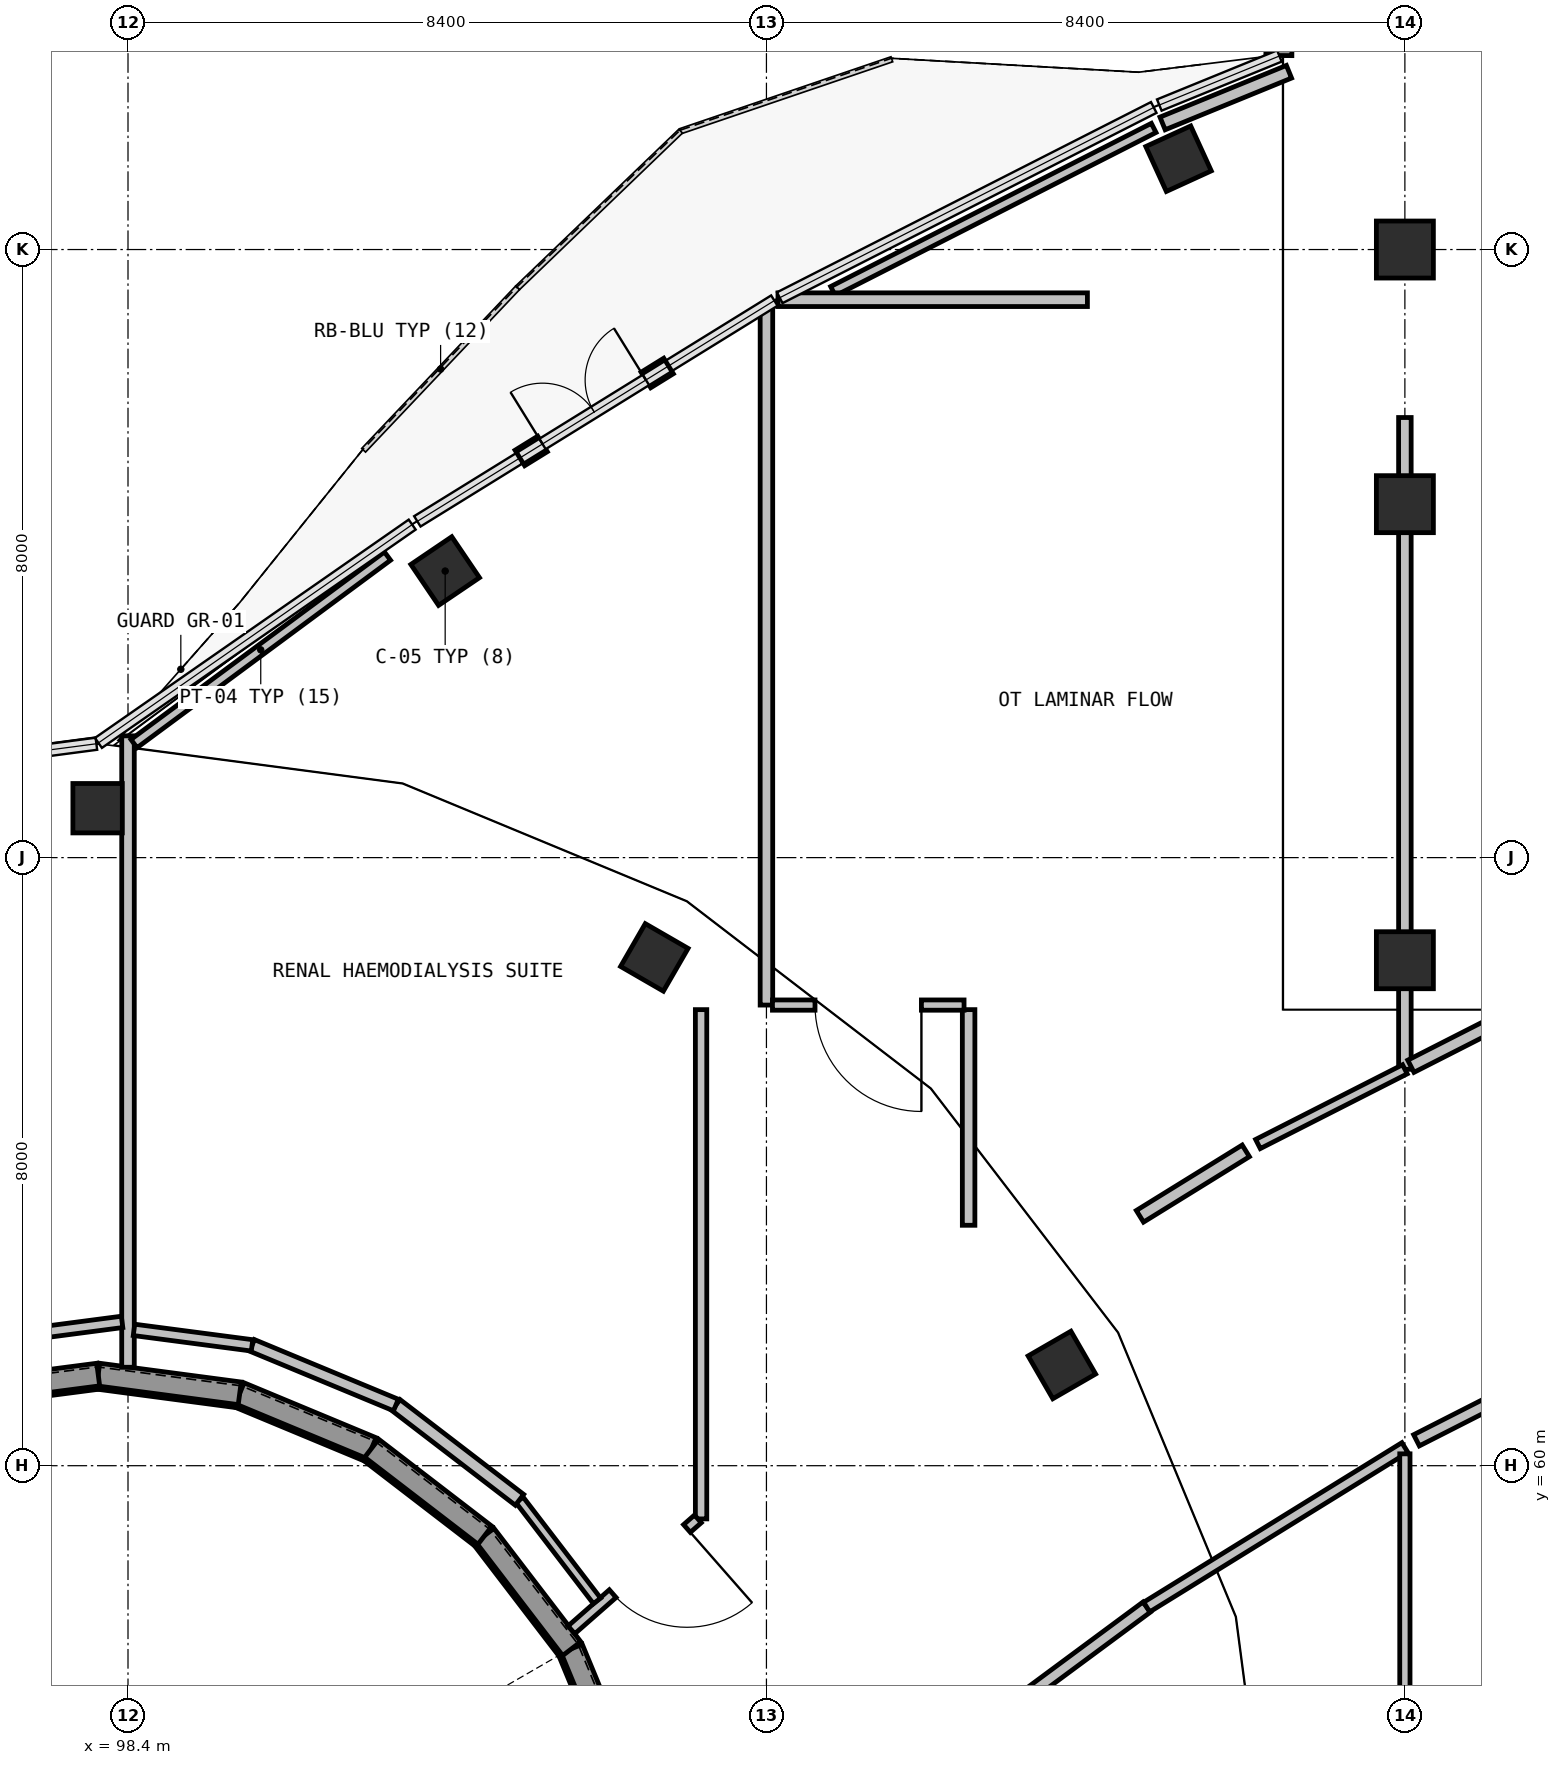
"""IFC4 building model, lengths in metres.
Left out: names, types, materials, properties, quantities, classifications, styles, units other than length and angle.
Written with IfcOpenShell. Run it as: python <this file> out.ifc"""

import sys

from ifc_helpers import new_model, si_unit, direction, frame, frame_2d, origin, origin_2d, place, context, subcontext, project, spatial, rectangle, circle, extrude, element, fill, save


model = new_model("IFC4")
c1 = context("Model", 3, precision=1e-05, world=origin(), true_north=direction((0.0, 1.0)))
c2 = subcontext(c1, "Body", "Model", "MODEL_VIEW")
j1 = project(units=[si_unit("LENGTHUNIT", "METRE"), si_unit("PLANEANGLEUNIT", "RADIAN")], contexts=[c1])
p1 = place(None, origin())
s1 = spatial("IfcSite", under=j1, at=p1, CompositionType="ELEMENT")
p2 = place(p1, origin())
s2 = spatial("IfcBuilding", under=s1, at=p2, CompositionType="ELEMENT")
p3 = place(p2, frame((0.0, 0.0, 15.0)))
s3 = spatial("IfcBuildingStorey", under=s2, at=p3, CompositionType="ELEMENT", Elevation=15.0)
for number, where, z_axis, x_axis in (
    (1, (110.687, 61.325, 0.0), (0.0, 0.0, 1.0), (0.866, 0.5, 0.0)),
    (2, (105.325, 66.687, 0.0), (0.0, 0.0, 1.0), (0.5, 0.866, 0.0)),
    (3, (98.0, 68.65, 0.0), (0.0, 0.0, 1.0), (0.0, 1.0, 0.0)),
):
    element("IfcColumn", number, at=place(p3, frame(where, z_axis=z_axis, x_axis=x_axis)), inside=s3, PredefinedType="COLUMN", context=c2, shape_type="SweptSolid", body=[
        extrude(circle(Radius=0.325, at=origin_2d()), origin(), (0.0, 0.0, 1.0), 4.2),
    ])
for number, where, z_axis, x_axis in (
    (4, (115.2, 66.65, 0.0), (0.0, 0.0, 1.0), (1.0, 0.0, 0.0)),
    (5, (115.2, 72.65, 0.0), (0.0, 0.0, 1.0), (1.0, 0.0, 0.0)),
    (6, (115.2, 76.0, 0.0), (0.0, 0.0, 1.0), (1.0, 0.0, 0.0)),
):
    element("IfcColumn", number, at=place(p3, frame(where, z_axis=z_axis, x_axis=x_axis)), inside=s3, PredefinedType="COLUMN", context=c2, shape_type="SweptSolid", body=[
        extrude(rectangle(XDim=0.75, YDim=0.75, at=origin_2d()), origin(), (0.0, 0.0, 1.0), 4.2),
    ])
for number, where, z_axis, x_axis in (
    (7, (102.573, 71.77, 0.0), (0.0, 0.0, 1.0), (-0.561, 0.828, 0.0)),
    (8, (112.222, 77.195, 0.0), (0.0, 0.0, 1.0), (-0.416, 0.909, 0.0)),
):
    element("IfcColumn", number, at=place(p3, frame(where, z_axis=z_axis, x_axis=x_axis)), inside=s3, PredefinedType="COLUMN", context=c2, shape_type="SweptSolid", body=[
        extrude(rectangle(XDim=0.65, YDim=0.65, at=origin_2d()), origin(), (0.0, 0.0, 1.0), 3.91),
    ])
p4 = place(p3, frame((103.556, 73.258, 0.0), z_axis=(0.0, 0.0, 1.0), x_axis=(0.85044606758, 0.526062245498, 0.0)))
e9 = element("IfcWall", 9, at=p4, inside=s3, PredefinedType="SOLIDWALL", context=c2, shape_type="SweptSolid", body=[
    extrude(rectangle(XDim=2.3, YDim=0.24, at=frame_2d((1.15, 0.0))), origin(), (0.0, 0.0, 1.0), 2.32),
])
p5 = place(p4, frame((0.35, 0.0, 0.0)))
e10 = element("IfcOpeningElement", 10, at=p5, cuts=e9, PredefinedType="OPENING", context=c2, shape_type="SweptSolid", body=[
    extrude(rectangle(XDim=1.6, YDim=2.2, at=frame_2d((0.8, 1.1))), frame((0.0, 0.13, 0.0), z_axis=(0.0, -1.0, 0.0), x_axis=(1.0, 0.0, 0.0)), (0.0, 0.0, 1.0), 0.26),
])
p6 = place(p3, frame((113.563, 78.552, 0.0), z_axis=(0.0, 0.0, 1.0), x_axis=(0.006887325881, 0.99997628209, 0.0)))
e11 = element("IfcWall", 11, at=p6, inside=s3, PredefinedType="SOLIDWALL", context=c2, shape_type="SweptSolid", body=[
    extrude(rectangle(XDim=5.388, YDim=0.3, at=frame_2d((2.694, 0.0))), origin(), (0.0, 0.0, 1.0), 3.895),
])
p7 = place(p6, frame((2.319, 0.0, 0.96)))
e12 = element("IfcOpeningElement", 12, at=p7, cuts=e11, PredefinedType="OPENING", context=c2, shape_type="SweptSolid", body=[
    extrude(rectangle(XDim=0.75, YDim=2.1, at=frame_2d((0.375, 1.05))), frame((0.0, 0.16, 0.0), z_axis=(0.0, -1.0, 0.0), x_axis=(1.0, 0.0, 0.0)), (0.0, 0.0, 1.0), 0.32),
])
p8 = place(p3, frame((101.606, 60.23, 0.0), z_axis=(0.0, 0.0, 1.0), x_axis=(-0.923330302292, 0.384006709406, 0.0)))
e13 = element("IfcWall", 13, at=p8, inside=s3, PredefinedType="SOLIDWALL", context=c2, shape_type="SweptSolid", body=[
    extrude(rectangle(XDim=1.88, YDim=0.3, at=frame_2d((0.94, 0.0))), origin(), (0.0, 0.0, 1.0), 3.895),
])
p9 = place(p3, frame((99.87, 60.952, 0.0), z_axis=(0.0, 0.0, 1.0), x_axis=(-0.991311701137, 0.131533688416, 0.0)))
e14 = element("IfcWall", 14, at=p9, inside=s3, PredefinedType="SOLIDWALL", context=c2, shape_type="SweptSolid", body=[
    extrude(rectangle(XDim=1.878, YDim=0.3, at=frame_2d((0.939, 0.0))), origin(), (0.0, 0.0, 1.0), 3.895),
])
p10 = place(p3, frame((98.008, 61.199, 0.0), z_axis=(0.0, 0.0, 1.0), x_axis=(-0.991606206969, -0.129294741965, 0.0)))
e15 = element("IfcWall", 15, at=p10, inside=s3, PredefinedType="SOLIDWALL", context=c2, shape_type="SweptSolid", body=[
    extrude(rectangle(XDim=1.879, YDim=0.3, at=frame_2d((0.939, 0.0))), origin(), (0.0, 0.0, 1.0), 3.895),
])
p11 = place(p3, frame((104.956, 55.855, 0.0), z_axis=(0.0, 0.0, 1.0), x_axis=(-0.381820428435, 0.924236528401, 0.0)))
e16 = element("IfcWall", 16, at=p11, inside=s3, PredefinedType="SOLIDWALL", context=c2, shape_type="SweptSolid", body=[
    extrude(rectangle(XDim=1.881, YDim=0.3, at=frame_2d((0.94, 0.0))), origin(), (0.0, 0.0, 1.0), 3.895),
])
p12 = place(p3, frame((104.238, 57.593, 0.0), z_axis=(0.0, 0.0, 1.0), x_axis=(-0.607850341861, 0.79405161161, 0.0)))
e17 = element("IfcWall", 17, at=p12, inside=s3, PredefinedType="SOLIDWALL", context=c2, shape_type="SweptSolid", body=[
    extrude(rectangle(XDim=1.879, YDim=0.3, at=frame_2d((0.939, 0.0))), origin(), (0.0, 0.0, 1.0), 3.895),
])
p13 = place(p3, frame((103.096, 59.085, 0.0), z_axis=(0.0, 0.0, 1.0), x_axis=(-0.792913688324, 0.609333966613, 0.0)))
e18 = element("IfcWall", 18, at=p13, inside=s3, PredefinedType="SOLIDWALL", context=c2, shape_type="SweptSolid", body=[
    extrude(rectangle(XDim=1.879, YDim=0.3, at=frame_2d((0.939, 0.0))), origin(), (0.0, 0.0, 1.0), 3.895),
])
p14 = place(p3, frame((98.4, 69.602, 0.0), z_axis=(0.0, 0.0, 1.0), x_axis=(0.0, -1.0, 0.0)))
e19 = element("IfcWall", 19, at=p14, inside=s3, PredefinedType="PARTITIONING", context=c2, shape_type="SweptSolid", body=[
    extrude(rectangle(XDim=8.307, YDim=0.165, at=frame_2d((4.154, 0.0))), origin(), (0.0, 0.0, 1.0), 3.895),
])
p15 = place(p3, frame((98.322, 61.892, 0.0), z_axis=(0.0, 0.0, 1.0), x_axis=(-0.991489958529, -0.130183186839, 0.0)))
e20 = element("IfcWall", 20, at=p15, inside=s3, PredefinedType="PARTITIONING", context=c2, shape_type="SweptSolid", body=[
    extrude(rectangle(XDim=2.374, YDim=0.15, at=frame_2d((1.187, 0.0))), origin(), (0.0, 0.0, 1.0), 3.895),
])
p16 = place(p3, frame((106.8, 75.251, 0.0), z_axis=(0.0, 0.0, 1.0), x_axis=(0.0, -1.0, 0.0)))
e21 = element("IfcWall", 21, at=p16, inside=s3, PredefinedType="PARTITIONING", context=c2, shape_type="SweptSolid", body=[
    extrude(rectangle(XDim=9.191, YDim=0.165, at=frame_2d((4.595, 0.0))), origin(), (0.0, 0.0, 1.0), 3.895),
])
p17 = place(p3, frame((105.94, 66.0, 0.0), z_axis=(0.0, 0.0, 1.0), x_axis=(0.0, -1.0, 0.0)))
e22 = element("IfcWall", 22, at=p17, inside=s3, PredefinedType="PARTITIONING", context=c2, shape_type="SweptSolid", body=[
    extrude(rectangle(XDim=6.7, YDim=0.15, at=frame_2d((3.35, 0.0))), origin(), (0.0, 0.0, 1.0), 3.895),
])
p18 = place(p3, frame((105.898, 59.3, 0.0), z_axis=(0.0, 0.0, 1.0), x_axis=(-0.751701560076, -0.65950342272, 0.0)))
e23 = element("IfcWall", 23, at=p18, inside=s3, PredefinedType="PARTITIONING", context=c2, shape_type="SweptSolid", body=[
    extrude(rectangle(XDim=2.214, YDim=0.135, at=frame_2d((1.107, 0.0))), origin(), (0.0, 0.0, 1.0), 3.895),
])
p19 = place(p18, frame((0.191, 0.0, 0.0)))
e24 = element("IfcOpeningElement", 24, at=p19, cuts=e23, PredefinedType="OPENING", context=c2, shape_type="SweptSolid", body=[
    extrude(rectangle(XDim=1.3, YDim=2.15, at=frame_2d((0.65, 1.075))), frame((0.0, 0.077, 0.0), z_axis=(0.0, -1.0, 0.0), x_axis=(1.0, 0.0, 0.0)), (0.0, 0.0, 1.0), 0.155),
])
p20 = place(p3, frame((104.571, 58.221, 0.0), z_axis=(0.0, 0.0, 1.0), x_axis=(-0.60854161906, 0.793521958028, 0.0)))
e25 = element("IfcWall", 25, at=p20, inside=s3, PredefinedType="PARTITIONING", context=c2, shape_type="SweptSolid", body=[
    extrude(rectangle(XDim=1.676, YDim=0.12, at=frame_2d((0.838, 0.0))), origin(), (0.0, 0.0, 1.0), 3.895),
])
p21 = place(p3, frame((103.551, 59.551, 0.0), z_axis=(0.0, 0.0, 1.0), x_axis=(-0.793491289639, 0.608581607729, 0.0)))
e26 = element("IfcWall", 26, at=p21, inside=s3, PredefinedType="PARTITIONING", context=c2, shape_type="SweptSolid", body=[
    extrude(rectangle(XDim=2.049, YDim=0.18, at=frame_2d((1.024, 0.0))), origin(), (0.0, 0.0, 1.0), 3.895),
])
p22 = place(p3, frame((101.925, 60.798, 0.0), z_axis=(0.0, 0.0, 1.0), x_axis=(-0.923745197655, 0.383007584532, 0.0)))
e27 = element("IfcWall", 27, at=p22, inside=s3, PredefinedType="PARTITIONING", context=c2, shape_type="SweptSolid", body=[
    extrude(rectangle(XDim=2.049, YDim=0.165, at=frame_2d((1.025, 0.0))), origin(), (0.0, 0.0, 1.0), 3.895),
])
p23 = place(p3, frame((100.032, 61.583, 0.0), z_axis=(0.0, 0.0, 1.0), x_axis=(-0.991473913665, 0.130305328065, 0.0)))
e28 = element("IfcWall", 28, at=p23, inside=s3, PredefinedType="PARTITIONING", context=c2, shape_type="SweptSolid", body=[
    extrude(rectangle(XDim=1.566, YDim=0.15, at=frame_2d((0.783, 0.0))), origin(), (0.0, 0.0, 1.0), 3.895),
])
p24 = place(p3, frame((98.479, 69.5, 0.0), z_axis=(0.0, 0.0, 1.0), x_axis=(0.803937569327, 0.594713699711, 0.0)))
e29 = element("IfcWall", 29, at=p24, inside=s3, PredefinedType="PARTITIONING", context=c2, shape_type="SweptSolid", body=[
    extrude(rectangle(XDim=4.148, YDim=0.135, at=frame_2d((2.074, 0.0))), origin(), (0.0, 0.0, 1.0), 3.895),
])
p25 = place(p3, frame((109.46, 56.406, 0.0), z_axis=(0.0, 0.0, 1.0), x_axis=(0.803833088097, 0.594854912125, 0.0)))
e30 = element("IfcWall", 30, at=p25, inside=s3, PredefinedType="PARTITIONING", context=c2, shape_type="SweptSolid", body=[
    extrude(rectangle(XDim=2.915, YDim=0.165, at=frame_2d((1.458, 0.0))), origin(), (0.0, 0.0, 1.0), 3.895),
])
p26 = place(p3, frame((111.803, 58.14, 0.0), z_axis=(0.0, 0.0, 1.0), x_axis=(0.850687032492, 0.525672495714, 0.0)))
e31 = element("IfcWall", 31, at=p26, inside=s3, PredefinedType="PARTITIONING", context=c2, shape_type="SweptSolid", body=[
    extrude(rectangle(XDim=3.993, YDim=0.15, at=frame_2d((1.997, 0.0))), origin(), (0.0, 0.0, 1.0), 3.895),
])
p27 = place(p3, frame((115.2, 60.156, 0.0), z_axis=(0.0, 0.0, 1.0), x_axis=(0.0, -1.0, 0.0)))
e32 = element("IfcWall", 32, at=p27, inside=s3, PredefinedType="PARTITIONING", context=c2, shape_type="SweptSolid", body=[
    extrude(rectangle(XDim=15.556, YDim=0.135, at=frame_2d((7.778, 0.0))), origin(), (0.0, 0.0, 1.0), 3.895),
])
p28 = place(p3, frame((111.895, 77.6, 0.0), z_axis=(0.0, 0.0, 1.0), x_axis=(-0.891217321541, -0.453576548982, 0.0)))
e33 = element("IfcWall", 33, at=p28, inside=s3, PredefinedType="PARTITIONING", context=c2, shape_type="SweptSolid", body=[
    extrude(rectangle(XDim=4.734, YDim=0.135, at=frame_2d((2.367, 0.0))), origin(), (0.0, 0.0, 1.0), 3.895),
])
p29 = place(p3, frame((106.952, 75.34, 0.0), z_axis=(0.0, 0.0, 1.0), x_axis=(1.0, 0.0, 0.0)))
e34 = element("IfcWall", 34, at=p29, inside=s3, PredefinedType="PARTITIONING", context=c2, shape_type="SweptSolid", body=[
    extrude(rectangle(XDim=4.071, YDim=0.18, at=frame_2d((2.036, 0.0))), origin(), (0.0, 0.0, 1.0), 3.895),
])
p30 = place(p3, frame((115.2, 73.79, 0.0), z_axis=(0.0, 0.0, 1.0), x_axis=(0.0, -1.0, 0.0)))
e35 = element("IfcWall", 35, at=p30, inside=s3, PredefinedType="PARTITIONING", context=c2, shape_type="SweptSolid", body=[
    extrude(rectangle(XDim=8.575, YDim=0.165, at=frame_2d((4.288, 0.0))), origin(), (0.0, 0.0, 1.0), 3.21),
])
p31 = place(p3, frame((115.2, 65.215, 0.0), z_axis=(0.0, 0.0, 1.0), x_axis=(-0.891321133159, -0.45337251525, 0.0)))
e36 = element("IfcWall", 36, at=p31, inside=s3, PredefinedType="PARTITIONING", context=c2, shape_type="SweptSolid", body=[
    extrude(rectangle(XDim=2.168, YDim=0.135, at=frame_2d((1.084, 0.0))), origin(), (0.0, 0.0, 1.0), 3.895),
])
p32 = place(p3, frame((113.107, 64.142, 0.0), z_axis=(0.0, 0.0, 1.0), x_axis=(-0.850576382598, -0.525851516463, 0.0)))
e37 = element("IfcWall", 37, at=p32, inside=s3, PredefinedType="PARTITIONING", context=c2, shape_type="SweptSolid", body=[
    extrude(rectangle(XDim=1.637, YDim=0.18, at=frame_2d((0.819, 0.0))), origin(), (0.0, 0.0, 1.0), 3.895),
])
p33 = place(p3, frame((109.46, 63.163, 0.0), z_axis=(0.0, 0.0, 1.0), x_axis=(0.0, 1.0, 0.0)))
e38 = element("IfcWall", 38, at=p33, inside=s3, PredefinedType="PARTITIONING", context=c2, shape_type="SweptSolid", body=[
    extrude(rectangle(XDim=2.837, YDim=0.165, at=frame_2d((1.418, 0.0))), origin(), (0.0, 0.0, 1.0), 3.895),
])
p34 = place(p3, frame((109.4, 66.06, 0.0), z_axis=(0.0, 0.0, 1.0), x_axis=(-1.0, 0.0, 0.0)))
e39 = element("IfcWall", 39, at=p34, inside=s3, PredefinedType="PARTITIONING", context=c2, shape_type="SweptSolid", body=[
    extrude(rectangle(XDim=2.521, YDim=0.135, at=frame_2d((1.26, 0.0))), origin(), (0.0, 0.0, 1.0), 3.895),
])
p35 = place(p34, frame((0.561, 0.0, 0.0)))
e40 = element("IfcOpeningElement", 40, at=p35, cuts=e39, PredefinedType="OPENING", context=c2, shape_type="SweptSolid", body=[
    extrude(rectangle(XDim=1.4, YDim=2.15, at=frame_2d((0.7, 1.075))), frame((0.0, 0.077, 0.0), z_axis=(0.0, -1.0, 0.0), x_axis=(1.0, 0.0, 0.0)), (0.0, 0.0, 1.0), 0.155),
])
p36 = place(p3, frame((115.353, 60.334, 0.0), z_axis=(0.0, 0.0, 1.0), x_axis=(0.891282591813, 0.453448278782, 0.0)))
e41 = element("IfcWall", 41, at=p36, inside=s3, PredefinedType="PARTITIONING", context=c2, shape_type="SweptSolid", body=[
    extrude(rectangle(XDim=4.175, YDim=0.165, at=frame_2d((2.087, 0.0))), origin(), (0.0, 0.0, 1.0), 3.895),
])
p37 = place(p3, frame((117.151, 66.208, 0.0), z_axis=(0.0, 0.0, 1.0), x_axis=(-0.891125519008, -0.453756883554, 0.0)))
e42 = element("IfcWall", 42, at=p37, inside=s3, PredefinedType="PARTITIONING", context=c2, shape_type="SweptSolid", body=[
    extrude(rectangle(XDim=2.101, YDim=0.18, at=frame_2d((1.05, 0.0))), origin(), (0.0, 0.0, 1.0), 3.895),
])
p38 = place(p3, frame((113.675, 78.339, 0.0), z_axis=(0.0, 0.0, 1.0), x_axis=(-0.925581582464, -0.37854819271, 0.0)))
e43 = element("IfcWall", 43, at=p38, inside=s3, PredefinedType="PARTITIONING", context=c2, shape_type="SweptSolid", body=[
    extrude(rectangle(XDim=1.797, YDim=0.18, at=frame_2d((0.898, 0.0))), origin(), (0.0, 0.0, 1.0), 3.895),
])
p39 = place(p5, origin())
e44 = element("IfcDoor", 44, at=p39, inside=s3, OperationType="DOUBLE_DOOR_SINGLE_SWING", PredefinedType="DOOR", context=c2, shape_type="SweptSolid", body=[
    extrude(rectangle(XDim=1.6, YDim=2.2, at=frame_2d((0.8, 1.1))), frame((0.0, 0.025, 0.0), z_axis=(0.0, -1.0, 0.0), x_axis=(1.0, 0.0, 0.0)), (0.0, 0.0, 1.0), 0.05),
])
fill(e10, e44)
p40 = place(p19, origin())
e45 = element("IfcDoor", 45, at=p40, inside=s3, OperationType="SINGLE_SWING_RIGHT", PredefinedType="DOOR", context=c2, shape_type="SweptSolid", body=[
    extrude(rectangle(XDim=1.3, YDim=2.15, at=frame_2d((0.65, 1.075))), frame((0.0, 0.025, 0.0), z_axis=(0.0, -1.0, 0.0), x_axis=(1.0, 0.0, 0.0)), (0.0, 0.0, 1.0), 0.05),
])
fill(e24, e45)
p41 = place(p35, origin())
e46 = element("IfcDoor", 46, at=p41, inside=s3, OperationType="SINGLE_SWING_RIGHT", PredefinedType="DOOR", context=c2, shape_type="SweptSolid", body=[
    extrude(rectangle(XDim=1.4, YDim=2.15, at=frame_2d((0.7, 1.075))), frame((0.0, 0.025, 0.0), z_axis=(0.0, -1.0, 0.0), x_axis=(1.0, 0.0, 0.0)), (0.0, 0.0, 1.0), 0.05),
])
fill(e40, e46)
save(model, sys.argv[1])
